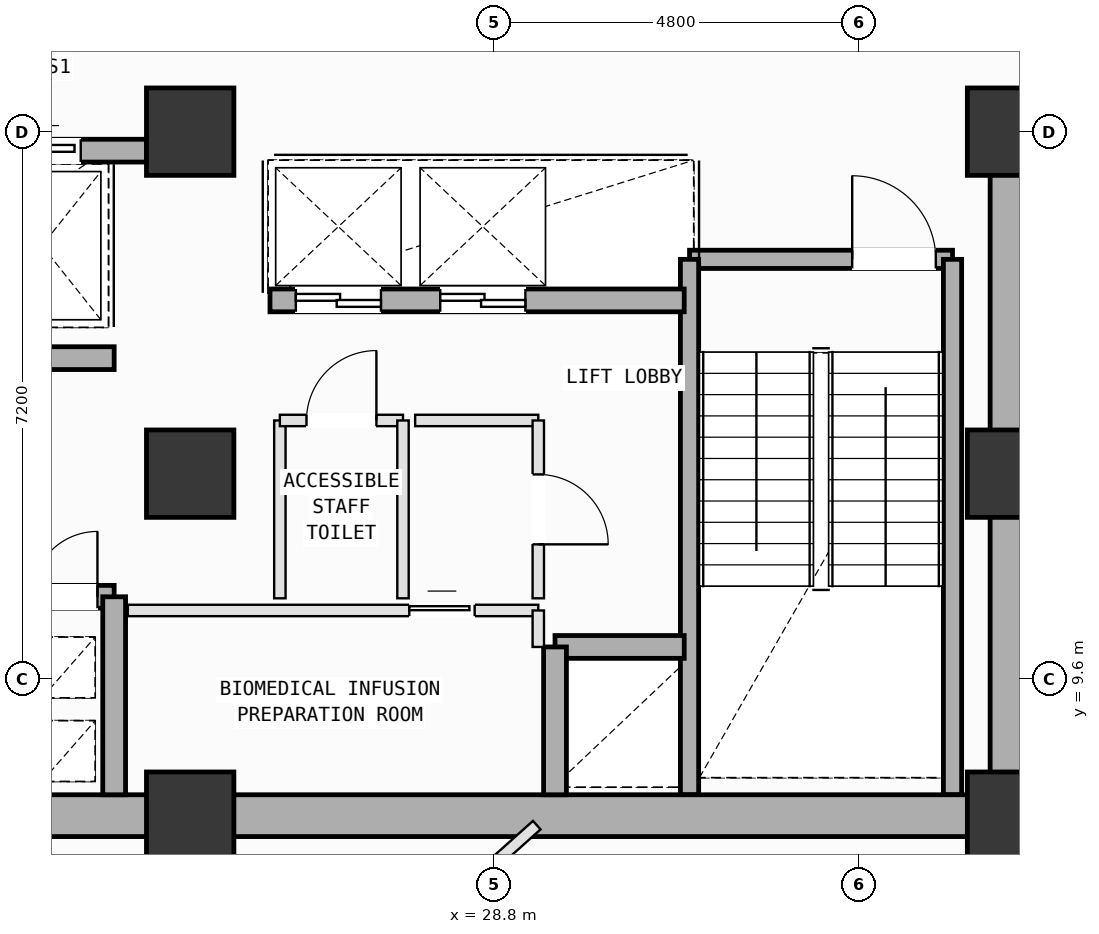
"""IFC4 building model, lengths in metres.
Left out: names, types, materials, properties, quantities, classifications, styles, units other than length and angle.
Written with IfcOpenShell. Run it as: python <this file> out.ifc"""

import sys

from ifc_helpers import new_model, si_unit, direction, frame, frame_2d, origin, origin_2d, place, context, subcontext, project, spatial, rectangle, extrude, element, fill, save


model = new_model("IFC4")
c1 = context("Model", 3, precision=1e-05, world=origin(), true_north=direction((0.0, 1.0)))
c2 = subcontext(c1, "Body", "Model", "MODEL_VIEW")
j1 = project(units=[si_unit("LENGTHUNIT", "METRE"), si_unit("PLANEANGLEUNIT", "RADIAN")], contexts=[c1])
p1 = place(None, origin())
s1 = spatial("IfcSite", under=j1, at=p1, CompositionType="ELEMENT")
p2 = place(p1, origin())
s2 = spatial("IfcBuilding", under=s1, at=p2, CompositionType="ELEMENT")
p3 = place(p2, frame((0.0, 0.0, 201.8)))
s3 = spatial("IfcBuildingStorey", under=s2, at=p3, CompositionType="ELEMENT", Elevation=201.8)
for number, where, z_axis, x_axis in (
    (1, (24.8, 7.8, 0.0), (0.0, 0.0, 1.0), (1.0, 0.0, 0.0)),
    (2, (24.8, 12.3, 0.0), (0.0, 0.0, 1.0), (1.0, 0.0, 0.0)),
    (3, (24.8, 16.8, 0.0), (0.0, 0.0, 1.0), (1.0, 0.0, 0.0)),
    (4, (35.6, 7.8, 0.0), (0.0, 0.0, 1.0), (1.0, 0.0, 0.0)),
    (5, (35.6, 12.3, 0.0), (0.0, 0.0, 1.0), (1.0, 0.0, 0.0)),
    (6, (35.6, 16.8, 0.0), (0.0, 0.0, 1.0), (1.0, 0.0, 0.0)),
):
    element("IfcColumn", number, at=place(p3, frame(where, z_axis=z_axis, x_axis=x_axis)), inside=s3, PredefinedType="COLUMN", context=c2, shape_type="SweptSolid", body=[
        extrude(rectangle(XDim=1.15, YDim=1.15, at=origin_2d()), origin(), (0.0, 0.0, 1.0), 4.0),
    ])
p4 = place(p3, frame((31.37, 15.12, 0.0), z_axis=(0.0, 0.0, 1.0), x_axis=(1.0, 0.0, 0.0)))
e7 = element("IfcWall", 7, at=p4, inside=s3, PredefinedType="SOLIDWALL", context=c2, shape_type="SweptSolid", body=[
    extrude(rectangle(XDim=3.46, YDim=0.24, at=frame_2d((1.73, 0.0))), origin(), (0.0, 0.0, 1.0), 3.7),
])
p5 = place(p4, frame((2.14, 0.0, 0.0)))
e8 = element("IfcOpeningElement", 8, at=p5, cuts=e7, PredefinedType="OPENING", context=c2, shape_type="SweptSolid", body=[
    extrude(rectangle(XDim=1.1, YDim=2.15, at=frame_2d((0.55, 1.075))), frame((0.0, 0.13, 0.0), z_axis=(0.0, -1.0, 0.0), x_axis=(1.0, 0.0, 0.0)), (0.0, 0.0, 1.0), 0.26),
])
for number, where, z_axis, x_axis in (
    (9, (34.83, 15.12, 0.0), (0.0, 0.0, 1.0), (0.0, -1.0, 0.0)),
    (10, (31.37, 8.075, 0.0), (0.0, 0.0, 1.0), (0.0, 1.0, 0.0)),
):
    element("IfcWall", number, at=place(p3, frame(where, z_axis=z_axis, x_axis=x_axis)), inside=s3, PredefinedType="SOLIDWALL", context=c2, shape_type="SweptSolid", body=[
        extrude(rectangle(XDim=7.045, YDim=0.24, at=frame_2d((3.522, 0.0))), origin(), (0.0, 0.0, 1.0), 3.7),
    ])
for number, where, z_axis, x_axis in (
    (11, (14.0, 7.8, 0.0), (0.0, 0.0, 1.0), (1.0, 0.0, 0.0)),
    (12, (24.8, 7.8, 0.0), (0.0, 0.0, 1.0), (1.0, 0.0, 0.0)),
):
    element("IfcWall", number, at=place(p3, frame(where, z_axis=z_axis, x_axis=x_axis)), inside=s3, PredefinedType="SHEAR", context=c2, shape_type="SweptSolid", body=[
        extrude(rectangle(XDim=10.8, YDim=0.55, at=frame_2d((5.4, 0.0))), origin(), (0.0, 0.0, 1.0), 3.7),
    ])
p6 = place(p3, frame((35.6, 7.8, 0.0), z_axis=(0.0, 0.0, 1.0), x_axis=(0.0, 1.0, 0.0)))
e13 = element("IfcWall", 13, at=p6, inside=s3, PredefinedType="SHEAR", context=c2, shape_type="SweptSolid", body=[
    extrude(rectangle(XDim=9.0, YDim=0.55, at=frame_2d((4.5, 0.0))), origin(), (0.0, 0.0, 1.0), 3.7),
])
p7 = place(p3, frame((19.85, 16.55, 0.0), z_axis=(0.0, 0.0, 1.0), x_axis=(1.0, 0.0, 0.0)))
e14 = element("IfcWall", 14, at=p7, inside=s3, PredefinedType="SOLIDWALL", context=c2, shape_type="SweptSolid", body=[
    extrude(rectangle(XDim=4.375, YDim=0.3, at=frame_2d((2.188, 0.0))), origin(), (0.0, 0.0, 1.0), 3.7),
])
p8 = place(p7, frame((0.475, 0.0, 0.0)))
e15 = element("IfcOpeningElement", 15, at=p8, cuts=e14, PredefinedType="OPENING", context=c2, shape_type="SweptSolid", body=[
    extrude(rectangle(XDim=1.25, YDim=2.18, at=frame_2d((0.625, 1.09))), frame((0.0, 0.16, 0.0), z_axis=(0.0, -1.0, 0.0), x_axis=(1.0, 0.0, 0.0)), (0.0, 0.0, 1.0), 0.32),
])
p9 = place(p7, frame((2.49, 0.0, 0.0)))
e16 = element("IfcOpeningElement", 16, at=p9, cuts=e14, PredefinedType="OPENING", context=c2, shape_type="SweptSolid", body=[
    extrude(rectangle(XDim=1.02, YDim=2.12, at=frame_2d((0.51, 1.06))), frame((0.0, 0.16, 0.0), z_axis=(0.0, -1.0, 0.0), x_axis=(1.0, 0.0, 0.0)), (0.0, 0.0, 1.0), 0.32),
])
p10 = place(p3, frame((18.5, 10.68, 0.0), z_axis=(0.0, 0.0, 1.0), x_axis=(1.0, 0.0, 0.0)))
e17 = element("IfcWall", 17, at=p10, inside=s3, PredefinedType="SOLIDWALL", context=c2, shape_type="SweptSolid", body=[
    extrude(rectangle(XDim=5.3, YDim=0.3, at=frame_2d((2.65, 0.0))), origin(), (0.0, 0.0, 1.0), 3.7),
])
p11 = place(p10, frame((4.22, 0.0, 0.0)))
e18 = element("IfcOpeningElement", 18, at=p11, cuts=e17, PredefinedType="OPENING", context=c2, shape_type="SweptSolid", body=[
    extrude(rectangle(XDim=0.86, YDim=2.06, at=frame_2d((0.43, 1.03))), frame((0.0, 0.16, 0.0), z_axis=(0.0, -1.0, 0.0), x_axis=(1.0, 0.0, 0.0)), (0.0, 0.0, 1.0), 0.32),
])
p12 = place(p10, frame((0.425, 0.0, 0.0)))
e19 = element("IfcOpeningElement", 19, at=p12, cuts=e17, PredefinedType="OPENING", context=c2, shape_type="SweptSolid", body=[
    extrude(rectangle(XDim=1.25, YDim=2.18, at=frame_2d((0.625, 1.09))), frame((0.0, 0.16, 0.0), z_axis=(0.0, -1.0, 0.0), x_axis=(1.0, 0.0, 0.0)), (0.0, 0.0, 1.0), 0.32),
])
p13 = place(p10, frame((2.525, 0.0, 0.0)))
e20 = element("IfcOpeningElement", 20, at=p13, cuts=e17, PredefinedType="OPENING", context=c2, shape_type="SweptSolid", body=[
    extrude(rectangle(XDim=1.25, YDim=2.18, at=frame_2d((0.625, 1.09))), frame((0.0, 0.16, 0.0), z_axis=(0.0, -1.0, 0.0), x_axis=(1.0, 0.0, 0.0)), (0.0, 0.0, 1.0), 0.32),
])
p14 = place(p3, frame((18.5, 13.82, 0.0), z_axis=(0.0, 0.0, 1.0), x_axis=(1.0, 0.0, 0.0)))
e21 = element("IfcWall", 21, at=p14, inside=s3, PredefinedType="SOLIDWALL", context=c2, shape_type="SweptSolid", body=[
    extrude(rectangle(XDim=5.3, YDim=0.3, at=frame_2d((2.65, 0.0))), origin(), (0.0, 0.0, 1.0), 3.7),
])
p15 = place(p14, frame((0.18, 0.0, 0.0)))
e22 = element("IfcOpeningElement", 22, at=p15, cuts=e21, PredefinedType="OPENING", context=c2, shape_type="SweptSolid", body=[
    extrude(rectangle(XDim=1.1, YDim=2.15, at=frame_2d((0.55, 1.075))), frame((0.0, 0.16, 0.0), z_axis=(0.0, -1.0, 0.0), x_axis=(1.0, 0.0, 0.0)), (0.0, 0.0, 1.0), 0.32),
])
p16 = place(p3, frame((23.8, 8.075, 0.0), z_axis=(0.0, 0.0, 1.0), x_axis=(0.0, 1.0, 0.0)))
e23 = element("IfcWall", 23, at=p16, inside=s3, PredefinedType="SOLIDWALL", context=c2, shape_type="SweptSolid", body=[
    extrude(rectangle(XDim=2.605, YDim=0.3, at=frame_2d((1.302, 0.0))), origin(), (0.0, 0.0, 1.0), 3.7),
])
p17 = place(p3, frame((29.6, 10.02, 0.0), z_axis=(0.0, 0.0, 1.0), x_axis=(1.0, 0.0, 0.0)))
e24 = element("IfcWall", 24, at=p17, inside=s3, PredefinedType="SOLIDWALL", context=c2, shape_type="SweptSolid", body=[
    extrude(rectangle(XDim=1.7, YDim=0.3, at=frame_2d((0.85, 0.0))), origin(), (0.0, 0.0, 1.0), 3.7),
])
p18 = place(p3, frame((29.6, 8.075, 0.0), z_axis=(0.0, 0.0, 1.0), x_axis=(0.0, 1.0, 0.0)))
e25 = element("IfcWall", 25, at=p18, inside=s3, PredefinedType="SOLIDWALL", context=c2, shape_type="SweptSolid", body=[
    extrude(rectangle(XDim=1.945, YDim=0.3, at=frame_2d((0.973, 0.0))), origin(), (0.0, 0.0, 1.0), 3.7),
])
p19 = place(p3, frame((25.85, 14.58, 0.0), z_axis=(0.0, 0.0, 1.0), x_axis=(1.0, 0.0, 0.0)))
e26 = element("IfcWall", 26, at=p19, inside=s3, PredefinedType="SOLIDWALL", context=c2, shape_type="SweptSolid", body=[
    extrude(rectangle(XDim=5.45, YDim=0.3, at=frame_2d((2.725, 0.0))), origin(), (0.0, 0.0, 1.0), 3.7),
])
p20 = place(p19, frame((0.34, 0.0, 0.0)))
e27 = element("IfcOpeningElement", 27, at=p20, cuts=e26, PredefinedType="OPENING", context=c2, shape_type="SweptSolid", body=[
    extrude(rectangle(XDim=1.12, YDim=2.15, at=frame_2d((0.56, 1.075))), frame((0.0, 0.16, 0.0), z_axis=(0.0, -1.0, 0.0), x_axis=(1.0, 0.0, 0.0)), (0.0, 0.0, 1.0), 0.32),
])
p21 = place(p19, frame((2.24, 0.0, 0.0)))
e28 = element("IfcOpeningElement", 28, at=p21, cuts=e26, PredefinedType="OPENING", context=c2, shape_type="SweptSolid", body=[
    extrude(rectangle(XDim=1.12, YDim=2.15, at=frame_2d((0.56, 1.075))), frame((0.0, 0.16, 0.0), z_axis=(0.0, -1.0, 0.0), x_axis=(1.0, 0.0, 0.0)), (0.0, 0.0, 1.0), 0.32),
])
p22 = place(p3, frame((23.98, 10.5, 0.0), z_axis=(0.0, 0.0, 1.0), x_axis=(1.0, 0.0, 0.0)))
e29 = element("IfcWall", 29, at=p22, inside=s3, PredefinedType="PARTITIONING", context=c2, shape_type="SweptSolid", body=[
    extrude(rectangle(XDim=5.4, YDim=0.15, at=frame_2d((2.7, 0.0))), origin(), (0.0, 0.0, 1.0), 3.7),
])
p23 = place(p22, frame((3.703, 0.0, 0.0)))
e30 = element("IfcOpeningElement", 30, at=p23, cuts=e29, PredefinedType="OPENING", context=c2, shape_type="SweptSolid", body=[
    extrude(rectangle(XDim=0.86, YDim=2.06, at=frame_2d((0.43, 1.03))), frame((0.0, 0.085, 0.0), z_axis=(0.0, -1.0, 0.0), x_axis=(1.0, 0.0, 0.0)), (0.0, 0.0, 1.0), 0.17),
])
p24 = place(p3, frame((29.38, 10.5, 0.0), z_axis=(0.0, 0.0, 1.0), x_axis=(0.0, -1.0, 0.0)))
e31 = element("IfcWall", 31, at=p24, inside=s3, PredefinedType="PARTITIONING", context=c2, shape_type="SweptSolid", body=[
    extrude(rectangle(XDim=0.48, YDim=0.15, at=frame_2d((0.24, 0.0))), origin(), (0.0, 0.0, 1.0), 3.7),
])
p25 = place(p3, frame((25.98, 10.66, 0.0), z_axis=(0.0, 0.0, 1.0), x_axis=(0.0, 1.0, 0.0)))
e32 = element("IfcWall", 32, at=p25, inside=s3, PredefinedType="PARTITIONING", context=c2, shape_type="SweptSolid", body=[
    extrude(rectangle(XDim=2.34, YDim=0.15, at=frame_2d((1.17, 0.0))), origin(), (0.0, 0.0, 1.0), 3.7),
])
p26 = place(p3, frame((25.98, 13.0, 0.0), z_axis=(0.0, 0.0, 1.0), x_axis=(1.0, 0.0, 0.0)))
e33 = element("IfcWall", 33, at=p26, inside=s3, PredefinedType="PARTITIONING", context=c2, shape_type="SweptSolid", body=[
    extrude(rectangle(XDim=1.62, YDim=0.15, at=frame_2d((0.81, 0.0))), origin(), (0.0, 0.0, 1.0), 3.7),
])
p27 = place(p26, frame((0.35, 0.0, 0.0)))
e34 = element("IfcOpeningElement", 34, at=p27, cuts=e33, PredefinedType="OPENING", context=c2, shape_type="SweptSolid", body=[
    extrude(rectangle(XDim=0.92, YDim=2.1, at=frame_2d((0.46, 1.05))), frame((0.0, 0.085, 0.0), z_axis=(0.0, -1.0, 0.0), x_axis=(1.0, 0.0, 0.0)), (0.0, 0.0, 1.0), 0.17),
])
p28 = place(p3, frame((27.6, 13.0, 0.0), z_axis=(0.0, 0.0, 1.0), x_axis=(0.0, -1.0, 0.0)))
e35 = element("IfcWall", 35, at=p28, inside=s3, PredefinedType="PARTITIONING", context=c2, shape_type="SweptSolid", body=[
    extrude(rectangle(XDim=2.34, YDim=0.15, at=frame_2d((1.17, 0.0))), origin(), (0.0, 0.0, 1.0), 3.7),
])
p29 = place(p3, frame((27.76, 13.0, 0.0), z_axis=(0.0, 0.0, 1.0), x_axis=(1.0, 0.0, 0.0)))
e36 = element("IfcWall", 36, at=p29, inside=s3, PredefinedType="PARTITIONING", context=c2, shape_type="SweptSolid", body=[
    extrude(rectangle(XDim=1.62, YDim=0.15, at=frame_2d((0.81, 0.0))), origin(), (0.0, 0.0, 1.0), 3.7),
])
p30 = place(p3, frame((29.38, 13.0, 0.0), z_axis=(0.0, 0.0, 1.0), x_axis=(0.0, -1.0, 0.0)))
e37 = element("IfcWall", 37, at=p30, inside=s3, PredefinedType="PARTITIONING", context=c2, shape_type="SweptSolid", body=[
    extrude(rectangle(XDim=2.34, YDim=0.15, at=frame_2d((1.17, 0.0))), origin(), (0.0, 0.0, 1.0), 3.7),
])
p31 = place(p30, frame((0.71, 0.0, 0.0)))
e38 = element("IfcOpeningElement", 38, at=p31, cuts=e37, PredefinedType="OPENING", context=c2, shape_type="SweptSolid", body=[
    extrude(rectangle(XDim=0.92, YDim=2.1, at=frame_2d((0.46, 1.05))), frame((0.0, 0.085, 0.0), z_axis=(0.0, -1.0, 0.0), x_axis=(1.0, 0.0, 0.0)), (0.0, 0.0, 1.0), 0.17),
])
p32 = place(p3, frame((35.6, 7.5, 0.0), z_axis=(0.0, 0.0, 1.0), x_axis=(1.0, 0.0, 0.0)))
e39 = element("IfcWall", 39, at=p32, inside=s3, PredefinedType="PARTITIONING", context=c2, shape_type="SweptSolid", body=[
    extrude(rectangle(XDim=0.55, YDim=0.15, at=frame_2d((0.275, 0.0))), origin(), (0.0, 0.0, 1.0), 3.7),
])
p33 = place(p3, frame((29.36, 7.675, 0.0), z_axis=(0.0, 0.0, 1.0), x_axis=(-0.745466954055, -0.666542587095, 0.0)))
e40 = element("IfcWall", 40, at=p33, inside=s3, PredefinedType="PARTITIONING", context=c2, shape_type="SweptSolid", body=[
    extrude(rectangle(XDim=12.76, YDim=0.15, at=frame_2d((6.38, 0.0))), origin(), (0.0, 0.0, 1.0), 3.7),
])
p34 = place(p5, origin())
e41 = element("IfcDoor", 41, at=p34, inside=s3, OperationType="SINGLE_SWING_LEFT", PredefinedType="DOOR", context=c2, shape_type="SweptSolid", body=[
    extrude(rectangle(XDim=1.1, YDim=2.15, at=frame_2d((0.55, 1.075))), frame((0.0, 0.025, 0.0), z_axis=(0.0, -1.0, 0.0), x_axis=(1.0, 0.0, 0.0)), (0.0, 0.0, 1.0), 0.05),
])
fill(e8, e41)
p35 = place(p11, origin())
e42 = element("IfcDoor", 42, at=p35, inside=s3, OperationType="SINGLE_SWING_RIGHT", PredefinedType="DOOR", context=c2, shape_type="SweptSolid", body=[
    extrude(rectangle(XDim=0.86, YDim=2.06, at=frame_2d((0.43, 1.03))), frame((0.0, 0.025, 0.0), z_axis=(0.0, -1.0, 0.0), x_axis=(1.0, 0.0, 0.0)), (0.0, 0.0, 1.0), 0.05),
])
fill(e18, e42)
p36 = place(p20, origin())
e43 = element("IfcDoor", 43, at=p36, inside=s3, OperationType="DOUBLE_DOOR_SLIDING", PredefinedType="DOOR", context=c2, shape_type="SweptSolid", body=[
    extrude(rectangle(XDim=1.12, YDim=2.15, at=frame_2d((0.56, 1.075))), frame((0.0, 0.025, 0.0), z_axis=(0.0, -1.0, 0.0), x_axis=(1.0, 0.0, 0.0)), (0.0, 0.0, 1.0), 0.05),
])
fill(e27, e43)
p37 = place(p21, origin())
e44 = element("IfcDoor", 44, at=p37, inside=s3, OperationType="DOUBLE_DOOR_SLIDING", PredefinedType="DOOR", context=c2, shape_type="SweptSolid", body=[
    extrude(rectangle(XDim=1.12, YDim=2.15, at=frame_2d((0.56, 1.075))), frame((0.0, 0.025, 0.0), z_axis=(0.0, -1.0, 0.0), x_axis=(1.0, 0.0, 0.0)), (0.0, 0.0, 1.0), 0.05),
])
fill(e28, e44)
p38 = place(p9, origin())
e45 = element("IfcDoor", 45, at=p38, inside=s3, OperationType="SLIDING_TO_LEFT", PredefinedType="DOOR", context=c2, shape_type="SweptSolid", body=[
    extrude(rectangle(XDim=1.02, YDim=2.12, at=frame_2d((0.51, 1.06))), frame((0.0, 0.025, 0.0), z_axis=(0.0, -1.0, 0.0), x_axis=(1.0, 0.0, 0.0)), (0.0, 0.0, 1.0), 0.05),
])
fill(e16, e45)
p39 = place(p27, origin())
e46 = element("IfcDoor", 46, at=p39, inside=s3, OperationType="SINGLE_SWING_RIGHT", PredefinedType="DOOR", context=c2, shape_type="SweptSolid", body=[
    extrude(rectangle(XDim=0.92, YDim=2.1, at=frame_2d((0.46, 1.05))), frame((0.0, 0.025, 0.0), z_axis=(0.0, -1.0, 0.0), x_axis=(1.0, 0.0, 0.0)), (0.0, 0.0, 1.0), 0.05),
])
fill(e34, e46)
p40 = place(p31, origin())
e47 = element("IfcDoor", 47, at=p40, inside=s3, OperationType="SINGLE_SWING_RIGHT", PredefinedType="DOOR", context=c2, shape_type="SweptSolid", body=[
    extrude(rectangle(XDim=0.92, YDim=2.1, at=frame_2d((0.46, 1.05))), frame((0.0, 0.025, 0.0), z_axis=(0.0, -1.0, 0.0), x_axis=(1.0, 0.0, 0.0)), (0.0, 0.0, 1.0), 0.05),
])
fill(e38, e47)
p41 = place(p23, origin())
e48 = element("IfcDoor", 48, at=p41, inside=s3, OperationType="SLIDING_TO_LEFT", PredefinedType="DOOR", context=c2, shape_type="SweptSolid", body=[
    extrude(rectangle(XDim=0.86, YDim=2.06, at=frame_2d((0.43, 1.03))), frame((0.0, 0.025, 0.0), z_axis=(0.0, -1.0, 0.0), x_axis=(1.0, 0.0, 0.0)), (0.0, 0.0, 1.0), 0.05),
])
fill(e30, e48)
save(model, sys.argv[1])
